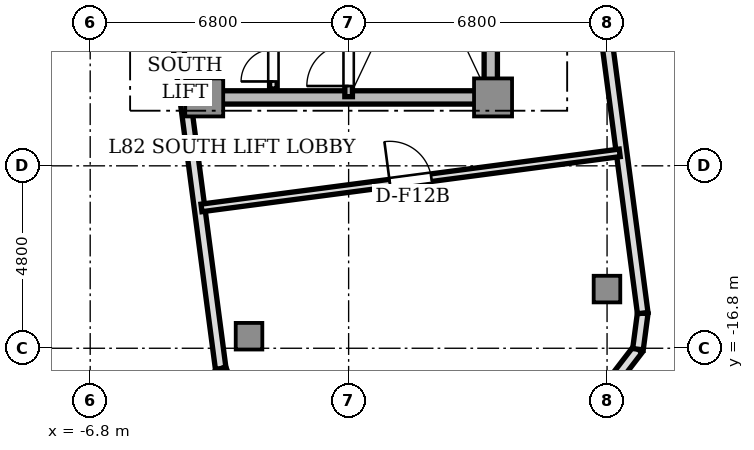
"""IFC4 building model, lengths in metres.
Left out: names, types, materials, properties, quantities, classifications, styles, units other than length and angle.
Written with IfcOpenShell. Run it as: python <this file> out.ifc"""

import sys

from ifc_helpers import new_model, si_unit, direction, frame, frame_2d, origin, origin_2d, place, context, subcontext, project, spatial, rectangle, extrude, source, transform, mapped, element, fill, save


model = new_model("IFC4")
c1 = context("Model", 3, precision=1e-05, world=origin(), true_north=direction((0.0, 1.0)))
c2 = subcontext(c1, "Body", "Model", "MODEL_VIEW")
j1 = project(units=[si_unit("LENGTHUNIT", "METRE"), si_unit("PLANEANGLEUNIT", "RADIAN")], contexts=[c1])
p1 = place(None, origin())
s1 = spatial("IfcSite", under=j1, at=p1, CompositionType="ELEMENT")
p2 = place(p1, origin())
s2 = spatial("IfcBuilding", under=s1, at=p2, CompositionType="ELEMENT")
p3 = place(p2, frame((0.0, 0.0, 296.5)))
s3 = spatial("IfcBuildingStorey", under=s2, at=p3, CompositionType="ELEMENT", Elevation=296.5)
p4 = place(p3, frame((-3.55, -10.2, 0.0), z_axis=(0.0, 0.0, 1.0), x_axis=(1.0, 0.0, 0.0)))
e1 = element("IfcWall", 1, at=p4, inside=s3, PredefinedType="SHEAR", context=c2, shape_type="SweptSolid", body=[
    extrude(rectangle(XDim=7.1, YDim=0.35, at=frame_2d((3.55, 0.0))), origin(), (0.0, 0.0, 1.0), 3.5),
])
p5 = place(p3, frame((3.74, -9.75, 0.0), z_axis=(0.0, 0.0, 1.0), x_axis=(0.0, 1.0, 0.0)))
e2 = element("IfcWall", 2, at=p5, inside=s3, PredefinedType="SHEAR", context=c2, shape_type="SweptSolid", body=[
    extrude(rectangle(XDim=6.9, YDim=0.35, at=frame_2d((3.45, 0.0))), origin(), (0.0, 0.0, 1.0), 3.5),
])
m1 = source(origin(), c2, "Body", "SweptSolid", [
    extrude(rectangle(XDim=1.0, YDim=1.0, at=origin_2d()), origin(), (0.0, 0.0, 1.0), 3.5),
])
for number, where, z_axis, x_axis in (
    (3, (-3.8, -10.2, 0.0), (0.0, 0.0, 1.0), (1.0, 0.0, 0.0)),
    (4, (3.8, -10.2, 0.0), (0.0, 0.0, 1.0), (1.0, 0.0, 0.0)),
):
    element("IfcColumn", number, at=place(p3, frame(where, z_axis=z_axis, x_axis=x_axis)), inside=s3, PredefinedType="COLUMN", context=c2, shape_type="MappedRepresentation", body=[
        mapped(m1, transform((0.0, 0.0, 0.0), scale=1.0)),
    ])
m2 = source(origin(), c2, "Body", "SweptSolid", [
    extrude(rectangle(XDim=0.7, YDim=0.7, at=origin_2d()), origin(), (0.0, 0.0, 1.0), 3.5),
])
for number, where, z_axis, x_axis in (
    (5, (-2.621, -16.483, 0.0), (0.0, 0.0, 1.0), (1.0, 0.0, 0.0)),
    (6, (6.798, -15.243, 0.0), (0.0, 0.0, 1.0), (1.0, 0.0, 0.0)),
):
    element("IfcColumn", number, at=place(p3, frame(where, z_axis=z_axis, x_axis=x_axis)), inside=s3, PredefinedType="COLUMN", context=c2, shape_type="MappedRepresentation", body=[
        mapped(m2, transform((0.0, 0.0, 0.0), scale=1.0)),
    ])
p6 = place(p3, frame((-4.821, -6.283, 0.0), z_axis=(0.0, 0.0, 1.0), x_axis=(0.130521347626, -0.991445499165, 0.0)))
e7 = element("IfcWall", 7, at=p6, inside=s3, PredefinedType="SOLIDWALL", context=c2, shape_type="SweptSolid", body=[
    extrude(rectangle(XDim=11.15, YDim=0.28, at=frame_2d((5.575, 0.0))), origin(), (0.0, 0.0, 1.0), 3.5),
])
p7 = place(p3, frame((-3.366, -17.338, 0.0), z_axis=(0.0, 0.0, 1.0), x_axis=(0.382659506909, -0.923889442397, 0.0)))
e8 = element("IfcWall", 8, at=p7, inside=s3, PredefinedType="SOLIDWALL", context=c2, shape_type="SweptSolid", body=[
    extrude(rectangle(XDim=0.958, YDim=0.28, at=frame_2d((0.479, 0.0))), origin(), (0.0, 0.0, 1.0), 3.5),
])
p8 = place(p3, frame((7.031, -17.585, 0.0), z_axis=(0.0, 0.0, 1.0), x_axis=(0.60861352168, 0.793466811674, 0.0)))
e9 = element("IfcWall", 9, at=p8, inside=s3, PredefinedType="SOLIDWALL", context=c2, shape_type="SweptSolid", body=[
    extrude(rectangle(XDim=0.958, YDim=0.28, at=frame_2d((0.479, 0.0))), origin(), (0.0, 0.0, 1.0), 3.5),
])
p9 = place(p3, frame((7.613, -16.825, 0.0), z_axis=(0.0, 0.0, 1.0), x_axis=(0.130527053476, 0.991444747987, 0.0)))
e10 = element("IfcWall", 10, at=p9, inside=s3, PredefinedType="SOLIDWALL", context=c2, shape_type="SweptSolid", body=[
    extrude(rectangle(XDim=0.958, YDim=0.28, at=frame_2d((0.479, 0.0))), origin(), (0.0, 0.0, 1.0), 3.5),
])
p10 = place(p3, frame((7.738, -15.876, 0.0), z_axis=(0.0, 0.0, 1.0), x_axis=(-0.130521347626, 0.991445499165, 0.0)))
e11 = element("IfcWall", 11, at=p10, inside=s3, PredefinedType="SOLIDWALL", context=c2, shape_type="SweptSolid", body=[
    extrude(rectangle(XDim=11.15, YDim=0.28, at=frame_2d((5.575, 0.0))), origin(), (0.0, 0.0, 1.0), 3.5),
])
p11 = place(p3, frame((0.0, -10.18, 0.0), z_axis=(0.0, 0.0, 1.0), x_axis=(0.0, 1.0, 0.0)))
e12 = element("IfcWall", 12, at=p11, inside=s3, PredefinedType="SOLIDWALL", context=c2, shape_type="SweptSolid", body=[
    extrude(rectangle(XDim=7.68, YDim=0.2, at=frame_2d((3.84, 0.0))), origin(), (0.0, 0.0, 1.0), 3.5),
])
p12 = place(p11, frame((0.28, 0.0, 0.0)))
e13 = element("IfcOpeningElement", 13, at=p12, cuts=e12, PredefinedType="OPENING", context=c2, shape_type="SweptSolid", body=[
    extrude(rectangle(XDim=1.1, YDim=2.15, at=frame_2d((0.55, 1.075))), frame((0.0, 0.11, 0.0), z_axis=(0.0, -1.0, 0.0), x_axis=(1.0, 0.0, 0.0)), (0.0, 0.0, 1.0), 0.22),
])
p13 = place(p3, frame((-1.98, -9.98, 0.0), z_axis=(0.0, 0.0, 1.0), x_axis=(0.0, 1.0, 0.0)))
e14 = element("IfcWall", 14, at=p13, inside=s3, PredefinedType="SOLIDWALL", context=c2, shape_type="SweptSolid", body=[
    extrude(rectangle(XDim=4.66, YDim=0.2, at=frame_2d((2.33, 0.0))), origin(), (0.0, 0.0, 1.0), 3.05),
])
p14 = place(p13, frame((0.2, 0.0, 0.0)))
e15 = element("IfcOpeningElement", 15, at=p14, cuts=e14, PredefinedType="OPENING", context=c2, shape_type="SweptSolid", body=[
    extrude(rectangle(XDim=0.85, YDim=2.1, at=frame_2d((0.425, 1.05))), frame((0.0, 0.11, 0.0), z_axis=(0.0, -1.0, 0.0), x_axis=(1.0, 0.0, 0.0)), (0.0, 0.0, 1.0), 0.22),
])
p15 = place(p3, frame((-3.872, -13.108, 0.0), z_axis=(0.0, 0.0, 1.0), x_axis=(0.991443437127, 0.130537009991, 0.0)))
e16 = element("IfcWall", 16, at=p15, inside=s3, PredefinedType="SOLIDWALL", context=c2, shape_type="SweptSolid", body=[
    extrude(rectangle(XDim=11.1, YDim=0.2, at=frame_2d((5.55, 0.0))), origin(), (0.0, 0.0, 1.0), 3.05),
])
p16 = place(p15, frame((5.0, 0.0, 0.0)))
e17 = element("IfcOpeningElement", 17, at=p16, cuts=e16, PredefinedType="OPENING", context=c2, shape_type="SweptSolid", body=[
    extrude(rectangle(XDim=1.1, YDim=2.15, at=frame_2d((0.55, 1.075))), frame((0.0, 0.11, 0.0), z_axis=(0.0, -1.0, 0.0), x_axis=(1.0, 0.0, 0.0)), (0.0, 0.0, 1.0), 0.22),
])
m3 = source(origin(), c2, "Body", "SweptSolid", [
    extrude(rectangle(XDim=1.1, YDim=0.05, at=origin_2d()), origin(), (0.0, 0.0, 1.0), 2.15),
])
p17 = place(p12, frame((0.55, 0.0, 0.0)))
e18 = element("IfcDoor", 18, at=p17, inside=s3, OperationType="SINGLE_SWING_LEFT", PredefinedType="DOOR", context=c2, shape_type="MappedRepresentation", body=[
    mapped(m3, transform((0.0, 0.0, 0.0), scale=1.0)),
])
fill(e13, e18)
m4 = source(origin(), c2, "Body", "SweptSolid", [
    extrude(rectangle(XDim=0.85, YDim=0.05, at=origin_2d()), origin(), (0.0, 0.0, 1.0), 2.1),
])
p18 = place(p14, frame((0.425, 0.0, 0.0)))
e19 = element("IfcDoor", 19, at=p18, inside=s3, OperationType="SINGLE_SWING_LEFT", PredefinedType="DOOR", context=c2, shape_type="MappedRepresentation", body=[
    mapped(m4, transform((0.0, 0.0, 0.0), scale=1.0)),
])
fill(e15, e19)
p19 = place(p16, frame((0.55, 0.0, 0.0)))
e20 = element("IfcDoor", 20, at=p19, inside=s3, OperationType="SINGLE_SWING_LEFT", PredefinedType="DOOR", context=c2, shape_type="MappedRepresentation", body=[
    mapped(m3, transform((0.0, 0.0, 0.0), scale=1.0)),
])
fill(e17, e20)
save(model, sys.argv[1])
